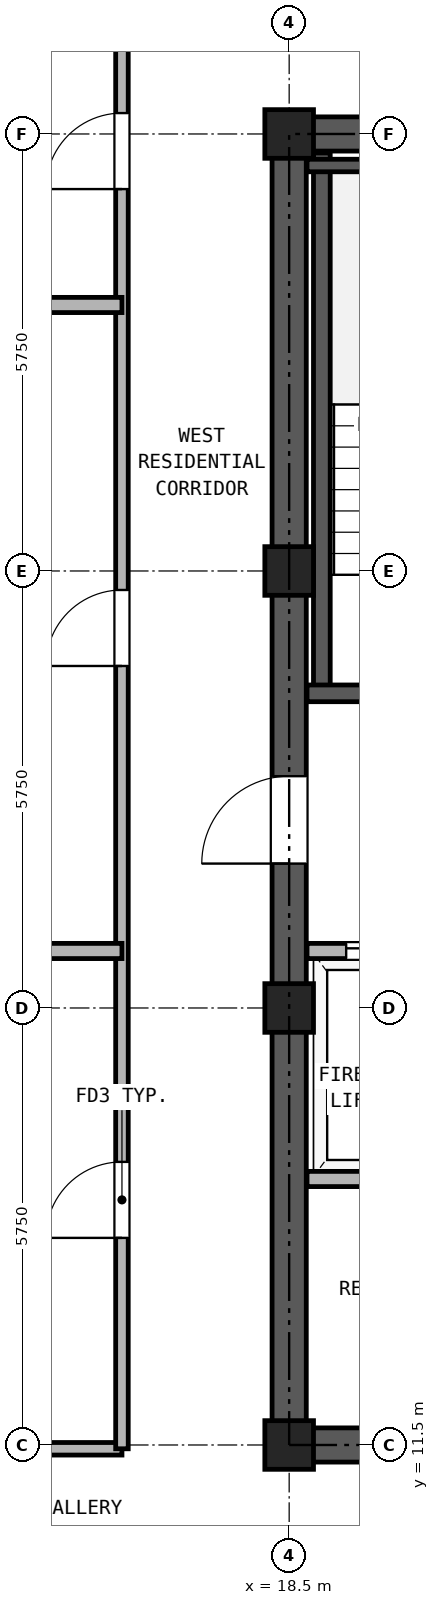
"""IFC4 building model, lengths in metres.
Left out: names, types, materials, properties, quantities, classifications, styles, units other than length and angle.
Written with IfcOpenShell. Run it as: python <this file> out.ifc"""

import sys

from ifc_helpers import new_model, si_unit, direction, frame, frame_2d, origin, origin_2d, place, context, subcontext, project, spatial, rectangle, hollow_rectangle, extrude, source, transform, mapped, element, fill, save


model = new_model("IFC4")
c1 = context("Model", 3, precision=1e-05, world=origin(), true_north=direction((0.0, 1.0)))
c2 = subcontext(c1, "Body", "Model", "MODEL_VIEW")
j1 = project(units=[si_unit("LENGTHUNIT", "METRE"), si_unit("PLANEANGLEUNIT", "RADIAN")], contexts=[c1])
p1 = place(None, origin())
s1 = spatial("IfcSite", under=j1, at=p1, CompositionType="ELEMENT")
p2 = place(p1, origin())
s2 = spatial("IfcBuilding", under=s1, at=p2, CompositionType="ELEMENT")
p3 = place(p2, frame((0.0, 0.0, 168.9)))
s3 = spatial("IfcBuildingStorey", under=s2, at=p3, CompositionType="ELEMENT", Elevation=168.9)
m1 = source(origin(), c2, "Body", "SweptSolid", [
    extrude(hollow_rectangle(XDim=0.64, YDim=0.64, WallThickness=0.035, at=origin_2d()), origin(), (0.0, 0.0, 1.0), 2.95),
])
for number, where, z_axis, x_axis in (
    (1, (18.5, 11.5, 0.0), (0.0, 0.0, 1.0), (1.0, 0.0, 0.0)),
    (2, (18.5, 17.25, 0.0), (0.0, 0.0, 1.0), (1.0, 0.0, 0.0)),
    (3, (18.5, 23.0, 0.0), (0.0, 0.0, 1.0), (1.0, 0.0, 0.0)),
    (4, (18.5, 28.75, 0.0), (0.0, 0.0, 1.0), (1.0, 0.0, 0.0)),
):
    element("IfcColumn", number, at=place(p3, frame(where, z_axis=z_axis, x_axis=x_axis)), inside=s3, PredefinedType="COLUMN", context=c2, shape_type="MappedRepresentation", body=[
        mapped(m1, transform((0.0, 0.0, 0.0), x_axis=(1.0, 0.0, 0.0), y_axis=(0.0, 1.0, 0.0), z_axis=(0.0, 0.0, 1.0), scale=1.0)),
    ])
p4 = place(p3, frame((18.275, 11.5, 0.0), z_axis=(0.0, 0.0, 1.0), x_axis=(1.0, 0.0, 0.0)))
e5 = element("IfcWall", 5, at=p4, inside=s3, PredefinedType="SHEAR", context=c2, shape_type="SweptSolid", body=[
    extrude(rectangle(XDim=10.45, YDim=0.45, at=frame_2d((5.225, 0.0))), origin(), (0.0, 0.0, 1.0), 2.95),
])
p5 = place(p4, frame((1.825, 0.0, 0.0)))
e6 = element("IfcOpeningElement", 6, at=p5, cuts=e5, PredefinedType="OPENING", context=c2, shape_type="SweptSolid", body=[
    extrude(rectangle(XDim=0.95, YDim=2.15, at=frame_2d((0.475, 1.075))), frame((0.0, 0.235, 0.0), z_axis=(0.0, -1.0, 0.0), x_axis=(1.0, 0.0, 0.0)), (0.0, 0.0, 1.0), 0.47),
])
p6 = place(p4, frame((5.325, 0.0, 0.0)))
e7 = element("IfcOpeningElement", 7, at=p6, cuts=e5, PredefinedType="OPENING", context=c2, shape_type="SweptSolid", body=[
    extrude(rectangle(XDim=0.95, YDim=2.15, at=frame_2d((0.475, 1.075))), frame((0.0, 0.235, 0.0), z_axis=(0.0, -1.0, 0.0), x_axis=(1.0, 0.0, 0.0)), (0.0, 0.0, 1.0), 0.47),
])
p7 = place(p4, frame((8.225, 0.0, 0.0)))
e8 = element("IfcOpeningElement", 8, at=p7, cuts=e5, PredefinedType="OPENING", context=c2, shape_type="SweptSolid", body=[
    extrude(rectangle(XDim=1.1, YDim=2.25, at=frame_2d((0.55, 1.125))), frame((0.0, 0.235, 0.0), z_axis=(0.0, -1.0, 0.0), x_axis=(1.0, 0.0, 0.0)), (0.0, 0.0, 1.0), 0.47),
])
p8 = place(p3, frame((18.275, 28.75, 0.0), z_axis=(0.0, 0.0, 1.0), x_axis=(1.0, 0.0, 0.0)))
e9 = element("IfcWall", 9, at=p8, inside=s3, PredefinedType="SHEAR", context=c2, shape_type="SweptSolid", body=[
    extrude(rectangle(XDim=10.45, YDim=0.45, at=frame_2d((5.225, 0.0))), origin(), (0.0, 0.0, 1.0), 2.95),
])
p9 = place(p8, frame((4.105, 0.0, 0.0)))
e10 = element("IfcOpeningElement", 10, at=p9, cuts=e9, PredefinedType="OPENING", context=c2, shape_type="SweptSolid", body=[
    extrude(rectangle(XDim=0.9, YDim=2.05, at=frame_2d((0.45, 1.025))), frame((0.0, 0.235, 0.0), z_axis=(0.0, -1.0, 0.0), x_axis=(1.0, 0.0, 0.0)), (0.0, 0.0, 1.0), 0.47),
])
p10 = place(p8, frame((5.645, 0.0, 0.0)))
e11 = element("IfcOpeningElement", 11, at=p10, cuts=e9, PredefinedType="OPENING", context=c2, shape_type="SweptSolid", body=[
    extrude(rectangle(XDim=0.9, YDim=2.05, at=frame_2d((0.45, 1.025))), frame((0.0, 0.235, 0.0), z_axis=(0.0, -1.0, 0.0), x_axis=(1.0, 0.0, 0.0)), (0.0, 0.0, 1.0), 0.47),
])
p11 = place(p3, frame((18.5, 11.725, 0.0), z_axis=(0.0, 0.0, 1.0), x_axis=(0.0, 1.0, 0.0)))
e12 = element("IfcWall", 12, at=p11, inside=s3, PredefinedType="SHEAR", context=c2, shape_type="SweptSolid", body=[
    extrude(rectangle(XDim=16.8, YDim=0.45, at=frame_2d((8.4, 0.0))), origin(), (0.0, 0.0, 1.0), 2.95),
])
p12 = place(p11, frame((7.425, 0.0, 0.0)))
e13 = element("IfcOpeningElement", 13, at=p12, cuts=e12, PredefinedType="OPENING", context=c2, shape_type="SweptSolid", body=[
    extrude(rectangle(XDim=1.15, YDim=2.2, at=frame_2d((0.575, 1.1))), frame((0.0, 0.235, 0.0), z_axis=(0.0, -1.0, 0.0), x_axis=(1.0, 0.0, 0.0)), (0.0, 0.0, 1.0), 0.47),
])
p13 = place(p3, frame((18.93, 21.39, 0.0), z_axis=(0.0, 0.0, 1.0), x_axis=(0.0, 1.0, 0.0)))
e14 = element("IfcWall", 14, at=p13, inside=s3, PredefinedType="SOLIDWALL", context=c2, shape_type="SweptSolid", body=[
    extrude(rectangle(XDim=7.11, YDim=0.22, at=frame_2d((3.555, 0.0))), origin(), (0.0, 0.0, 1.0), 2.95),
])
p14 = place(p3, frame((18.735, 28.335, 0.0), z_axis=(0.0, 0.0, 1.0), x_axis=(1.0, 0.0, 0.0)))
e15 = element("IfcWall", 15, at=p14, inside=s3, PredefinedType="PARTITIONING", context=c2, shape_type="SweptSolid", body=[
    extrude(rectangle(XDim=3.375, YDim=0.165, at=frame_2d((1.688, 0.0))), origin(), (0.0, 0.0, 1.0), 2.95),
])
p15 = place(p3, frame((18.735, 21.39, 0.0), z_axis=(0.0, 0.0, 1.0), x_axis=(1.0, 0.0, 0.0)))
e16 = element("IfcWall", 16, at=p15, inside=s3, PredefinedType="SOLIDWALL", context=c2, shape_type="SweptSolid", body=[
    extrude(rectangle(XDim=6.395, YDim=0.22, at=frame_2d((3.197, 0.0))), origin(), (0.0, 0.0, 1.0), 2.95),
])
p16 = place(p15, frame((1.115, 0.0, 0.0)))
e17 = element("IfcOpeningElement", 17, at=p16, cuts=e16, PredefinedType="OPENING", context=c2, shape_type="SweptSolid", body=[
    extrude(rectangle(XDim=1.15, YDim=2.2, at=frame_2d((0.575, 1.1))), frame((0.0, 0.12, 0.0), z_axis=(0.0, -1.0, 0.0), x_axis=(1.0, 0.0, 0.0)), (0.0, 0.0, 1.0), 0.24),
])
p17 = place(p15, frame((4.845, 0.0, 0.0)))
e18 = element("IfcOpeningElement", 18, at=p17, cuts=e16, PredefinedType="OPENING", context=c2, shape_type="SweptSolid", body=[
    extrude(rectangle(XDim=1.1, YDim=2.25, at=frame_2d((0.55, 1.125))), frame((0.0, 0.12, 0.0), z_axis=(0.0, -1.0, 0.0), x_axis=(1.0, 0.0, 0.0)), (0.0, 0.0, 1.0), 0.24),
])
p18 = place(p3, frame((18.735, 18.0, 0.0), z_axis=(0.0, 0.0, 1.0), x_axis=(1.0, 0.0, 0.0)))
e19 = element("IfcWall", 19, at=p18, inside=s3, PredefinedType="PARTITIONING", context=c2, shape_type="SweptSolid", body=[
    extrude(rectangle(XDim=9.53, YDim=0.2, at=frame_2d((4.765, 0.0))), origin(), (0.0, 0.0, 1.0), 2.95),
])
p19 = place(p18, frame((0.515, 0.0, 0.0)))
e20 = element("IfcOpeningElement", 20, at=p19, cuts=e19, PredefinedType="OPENING", context=c2, shape_type="SweptSolid", body=[
    extrude(rectangle(XDim=1.3, YDim=2.3, at=frame_2d((0.65, 1.15))), frame((0.0, 0.11, 0.0), z_axis=(0.0, -1.0, 0.0), x_axis=(1.0, 0.0, 0.0)), (0.0, 0.0, 1.0), 0.22),
])
p20 = place(p18, frame((2.615, 0.0, 0.0)))
e21 = element("IfcOpeningElement", 21, at=p20, cuts=e19, PredefinedType="OPENING", context=c2, shape_type="SweptSolid", body=[
    extrude(rectangle(XDim=1.3, YDim=2.3, at=frame_2d((0.65, 1.15))), frame((0.0, 0.11, 0.0), z_axis=(0.0, -1.0, 0.0), x_axis=(1.0, 0.0, 0.0)), (0.0, 0.0, 1.0), 0.22),
])
p21 = place(p18, frame((7.115, 0.0, 0.0)))
e22 = element("IfcOpeningElement", 22, at=p21, cuts=e19, PredefinedType="OPENING", context=c2, shape_type="SweptSolid", body=[
    extrude(rectangle(XDim=1.0, YDim=2.15, at=frame_2d((0.5, 1.075))), frame((0.0, 0.11, 0.0), z_axis=(0.0, -1.0, 0.0), x_axis=(1.0, 0.0, 0.0)), (0.0, 0.0, 1.0), 0.22),
])
p22 = place(p3, frame((18.735, 15.0, 0.0), z_axis=(0.0, 0.0, 1.0), x_axis=(1.0, 0.0, 0.0)))
e23 = element("IfcWall", 23, at=p22, inside=s3, PredefinedType="PARTITIONING", context=c2, shape_type="SweptSolid", body=[
    extrude(rectangle(XDim=9.53, YDim=0.2, at=frame_2d((4.765, 0.0))), origin(), (0.0, 0.0, 1.0), 2.95),
])
p23 = place(p3, frame((7.6, 11.45, 0.0), z_axis=(0.0, 0.0, 1.0), x_axis=(1.0, 0.0, 0.0)))
e24 = element("IfcWall", 24, at=p23, inside=s3, PredefinedType="PARTITIONING", context=c2, shape_type="SweptSolid", body=[
    extrude(rectangle(XDim=8.7, YDim=0.165, at=frame_2d((4.35, 0.0))), origin(), (0.0, 0.0, 1.0), 2.323),
])
p24 = place(p3, frame((16.3, 11.45, 0.0), z_axis=(0.0, 0.0, 1.0), x_axis=(0.0, 1.0, 0.0)))
e25 = element("IfcWall", 25, at=p24, inside=s3, PredefinedType="PARTITIONING", context=c2, shape_type="SweptSolid", body=[
    extrude(rectangle(XDim=23.69, YDim=0.165, at=frame_2d((11.845, 0.0))), origin(), (0.0, 0.0, 1.0), 2.95),
])
p25 = place(p24, frame((2.775, 0.0, 0.0)))
e26 = element("IfcOpeningElement", 26, at=p25, cuts=e25, PredefinedType="OPENING", context=c2, shape_type="SweptSolid", body=[
    extrude(rectangle(XDim=1.0, YDim=2.15, at=frame_2d((0.5, 1.075))), frame((0.0, 0.093, 0.0), z_axis=(0.0, -1.0, 0.0), x_axis=(1.0, 0.0, 0.0)), (0.0, 0.0, 1.0), 0.185),
])
p26 = place(p24, frame((10.3, 0.0, 0.0)))
e27 = element("IfcOpeningElement", 27, at=p26, cuts=e25, PredefinedType="OPENING", context=c2, shape_type="SweptSolid", body=[
    extrude(rectangle(XDim=1.0, YDim=2.15, at=frame_2d((0.5, 1.075))), frame((0.0, 0.093, 0.0), z_axis=(0.0, -1.0, 0.0), x_axis=(1.0, 0.0, 0.0)), (0.0, 0.0, 1.0), 0.185),
])
p27 = place(p24, frame((16.575, 0.0, 0.0)))
e28 = element("IfcOpeningElement", 28, at=p27, cuts=e25, PredefinedType="OPENING", context=c2, shape_type="SweptSolid", body=[
    extrude(rectangle(XDim=1.0, YDim=2.15, at=frame_2d((0.5, 1.075))), frame((0.0, 0.093, 0.0), z_axis=(0.0, -1.0, 0.0), x_axis=(1.0, 0.0, 0.0)), (0.0, 0.0, 1.0), 0.185),
])
for number, where, z_axis, x_axis in (
    (29, (0.16, 18.0, 0.0), (0.0, 0.0, 1.0), (1.0, 0.0, 0.0)),
    (30, (0.16, 26.5, 0.0), (0.0, 0.0, 1.0), (1.0, 0.0, 0.0)),
):
    element("IfcWall", number, at=place(p3, frame(where, z_axis=z_axis, x_axis=x_axis)), inside=s3, PredefinedType="PARTITIONING", context=c2, shape_type="SweptSolid", body=[
        extrude(rectangle(XDim=16.14, YDim=0.2, at=frame_2d((8.07, 0.0))), origin(), (0.0, 0.0, 1.0), 2.95),
    ])
p28 = place(p19, origin())
e31 = element("IfcDoor", 31, at=p28, inside=s3, OperationType="DOUBLE_DOOR_SLIDING", PredefinedType="DOOR", context=c2, shape_type="SweptSolid", body=[
    extrude(rectangle(XDim=1.3, YDim=2.3, at=frame_2d((0.65, 1.15))), frame((0.0, 0.025, 0.0), z_axis=(0.0, -1.0, 0.0), x_axis=(1.0, 0.0, 0.0)), (0.0, 0.0, 1.0), 0.05),
])
fill(e20, e31)
p29 = place(p12, frame((1.15, 0.0, 0.0), z_axis=(0.0, 0.0, 1.0), x_axis=(-1.0, 0.0, 0.0)))
e32 = element("IfcDoor", 32, at=p29, inside=s3, OperationType="SINGLE_SWING_LEFT", PredefinedType="DOOR", context=c2, shape_type="SweptSolid", body=[
    extrude(rectangle(XDim=1.15, YDim=2.2, at=frame_2d((0.575, 1.1))), frame((0.0, 0.025, 0.0), z_axis=(0.0, -1.0, 0.0), x_axis=(1.0, 0.0, 0.0)), (0.0, 0.0, 1.0), 0.05),
])
fill(e13, e32)
p30 = place(p25, origin())
e33 = element("IfcDoor", 33, at=p30, inside=s3, OperationType="SINGLE_SWING_LEFT", PredefinedType="DOOR", context=c2, shape_type="SweptSolid", body=[
    extrude(rectangle(XDim=1.0, YDim=2.15, at=frame_2d((0.5, 1.075))), frame((0.0, 0.025, 0.0), z_axis=(0.0, -1.0, 0.0), x_axis=(1.0, 0.0, 0.0)), (0.0, 0.0, 1.0), 0.05),
])
fill(e26, e33)
p31 = place(p26, origin())
e34 = element("IfcDoor", 34, at=p31, inside=s3, OperationType="SINGLE_SWING_LEFT", PredefinedType="DOOR", context=c2, shape_type="SweptSolid", body=[
    extrude(rectangle(XDim=1.0, YDim=2.15, at=frame_2d((0.5, 1.075))), frame((0.0, 0.025, 0.0), z_axis=(0.0, -1.0, 0.0), x_axis=(1.0, 0.0, 0.0)), (0.0, 0.0, 1.0), 0.05),
])
fill(e27, e34)
p32 = place(p27, origin())
e35 = element("IfcDoor", 35, at=p32, inside=s3, OperationType="SINGLE_SWING_LEFT", PredefinedType="DOOR", context=c2, shape_type="SweptSolid", body=[
    extrude(rectangle(XDim=1.0, YDim=2.15, at=frame_2d((0.5, 1.075))), frame((0.0, 0.025, 0.0), z_axis=(0.0, -1.0, 0.0), x_axis=(1.0, 0.0, 0.0)), (0.0, 0.0, 1.0), 0.05),
])
fill(e28, e35)
save(model, sys.argv[1])
